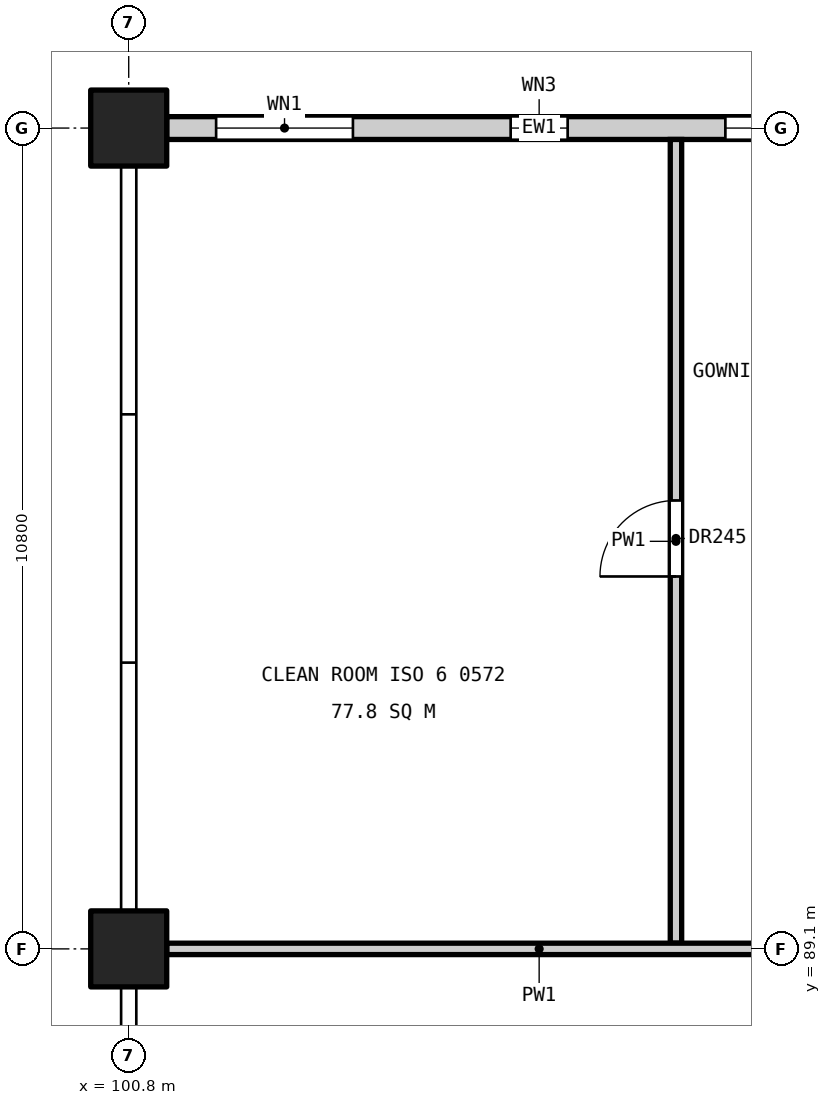
"""IFC4 building model, lengths in metres.
Left out: names, types, materials, properties, quantities, classifications, styles, units other than length and angle.
Written with IfcOpenShell. Run it as: python <this file> out.ifc"""

import sys

from ifc_helpers import new_model, si_unit, direction, frame, frame_2d, origin, origin_2d, place, context, subcontext, project, spatial, rectangle, extrude, element, fill, save


model = new_model("IFC4")
c1 = context("Model", 3, precision=1e-05, world=origin(), true_north=direction((0.0, 1.0)))
c2 = subcontext(c1, "Body", "Model", "MODEL_VIEW")
j1 = project(units=[si_unit("LENGTHUNIT", "METRE"), si_unit("PLANEANGLEUNIT", "RADIAN")], contexts=[c1])
p1 = place(None, origin())
s1 = spatial("IfcSite", under=j1, at=p1, CompositionType="ELEMENT")
p2 = place(p1, origin())
s2 = spatial("IfcBuilding", under=s1, at=p2, CompositionType="ELEMENT")
p3 = place(p2, frame((0.0, 0.0, 27.0)))
s3 = spatial("IfcBuildingStorey", under=s2, at=p3, CompositionType="ELEMENT", Elevation=27.0)
for number, where, z_axis, x_axis in (
    (1, (100.8, 89.1, 0.0), (0.0, 0.0, 1.0), (1.0, 0.0, 0.0)),
    (2, (100.8, 99.9, 0.0), (0.0, 0.0, 1.0), (1.0, 0.0, 0.0)),
):
    element("IfcColumn", number, at=place(p3, frame(where, z_axis=z_axis, x_axis=x_axis)), inside=s3, PredefinedType="COLUMN", context=c2, shape_type="SweptSolid", body=[
        extrude(rectangle(XDim=1.0, YDim=1.0, at=origin_2d()), origin(), (0.0, 0.0, 1.0), 4.8),
    ])
p4 = place(p3, frame((111.1, 99.9, 0.0), z_axis=(0.0, 0.0, 1.0), x_axis=(-1.0, 0.0, 0.0)))
e3 = element("IfcWall", 3, at=p4, inside=s3, PredefinedType="STANDARD", context=c2, shape_type="SweptSolid", body=[
    extrude(rectangle(XDim=9.8, YDim=0.3, at=frame_2d((4.9, 0.0))), origin(), (0.0, 0.0, 1.0), 3.85),
])
p5 = place(p4, frame((0.65, 0.0, 0.9)))
e4 = element("IfcOpeningElement", 4, at=p5, cuts=e3, PredefinedType="OPENING", context=c2, shape_type="SweptSolid", body=[
    extrude(rectangle(XDim=1.8, YDim=2.4, at=frame_2d((0.9, 1.2))), frame((0.0, 0.16, 0.0), z_axis=(0.0, -1.0, 0.0), x_axis=(1.0, 0.0, 0.0)), (0.0, 0.0, 1.0), 0.32),
])
p6 = place(p4, frame((4.525, 0.0, 0.8)))
e5 = element("IfcOpeningElement", 5, at=p6, cuts=e3, PredefinedType="OPENING", context=c2, shape_type="SweptSolid", body=[
    extrude(rectangle(XDim=0.75, YDim=1.2, at=frame_2d((0.375, 0.6))), frame((0.0, 0.16, 0.0), z_axis=(0.0, -1.0, 0.0), x_axis=(1.0, 0.0, 0.0)), (0.0, 0.0, 1.0), 0.32),
])
p7 = place(p4, frame((7.35, 0.0, 0.9)))
e6 = element("IfcOpeningElement", 6, at=p7, cuts=e3, PredefinedType="OPENING", context=c2, shape_type="SweptSolid", body=[
    extrude(rectangle(XDim=1.8, YDim=2.4, at=frame_2d((0.9, 1.2))), frame((0.0, 0.16, 0.0), z_axis=(0.0, -1.0, 0.0), x_axis=(1.0, 0.0, 0.0)), (0.0, 0.0, 1.0), 0.32),
])
p8 = place(p3, frame((108.0, 89.175, 0.0), z_axis=(0.0, 0.0, 1.0), x_axis=(0.0, 1.0, 0.0)))
e7 = element("IfcWall", 7, at=p8, inside=s3, PredefinedType="PARTITIONING", context=c2, shape_type="SweptSolid", body=[
    extrude(rectangle(XDim=10.575, YDim=0.15, at=frame_2d((5.288, 0.0))), origin(), (0.0, 0.0, 1.0), 3.55),
])
p9 = place(p8, frame((4.825, 0.0, 0.0)))
e8 = element("IfcOpeningElement", 8, at=p9, cuts=e7, PredefinedType="OPENING", context=c2, shape_type="SweptSolid", body=[
    extrude(rectangle(XDim=1.0, YDim=2.1, at=frame_2d((0.5, 1.05))), frame((0.0, 0.085, 0.0), z_axis=(0.0, -1.0, 0.0), x_axis=(1.0, 0.0, 0.0)), (0.0, 0.0, 1.0), 0.17),
])
p10 = place(p3, frame((111.1, 89.1, 0.0), z_axis=(0.0, 0.0, 1.0), x_axis=(-1.0, 0.0, 0.0)))
e9 = element("IfcWall", 9, at=p10, inside=s3, PredefinedType="PARTITIONING", context=c2, shape_type="SweptSolid", body=[
    extrude(rectangle(XDim=9.8, YDim=0.15, at=frame_2d((4.9, 0.0))), origin(), (0.0, 0.0, 1.0), 3.85),
])
p11 = place(p5, origin())
e10 = element("IfcWindow", 10, at=p11, inside=s3, PartitioningType="SINGLE_PANEL", PredefinedType="WINDOW", context=c2, shape_type="SweptSolid", body=[
    extrude(rectangle(XDim=1.8, YDim=2.4, at=frame_2d((0.9, 1.2))), frame((0.0, 0.03, 0.0), z_axis=(0.0, -1.0, 0.0), x_axis=(1.0, 0.0, 0.0)), (0.0, 0.0, 1.0), 0.06),
])
fill(e4, e10)
p12 = place(p6, origin())
e11 = element("IfcWindow", 11, at=p12, inside=s3, PartitioningType="SINGLE_PANEL", PredefinedType="WINDOW", context=c2, shape_type="SweptSolid", body=[
    extrude(rectangle(XDim=0.75, YDim=1.2, at=frame_2d((0.375, 0.6))), frame((0.0, 0.03, 0.0), z_axis=(0.0, -1.0, 0.0), x_axis=(1.0, 0.0, 0.0)), (0.0, 0.0, 1.0), 0.06),
])
fill(e5, e11)
p13 = place(p7, origin())
e12 = element("IfcWindow", 12, at=p13, inside=s3, PartitioningType="SINGLE_PANEL", PredefinedType="WINDOW", context=c2, shape_type="SweptSolid", body=[
    extrude(rectangle(XDim=1.8, YDim=2.4, at=frame_2d((0.9, 1.2))), frame((0.0, 0.03, 0.0), z_axis=(0.0, -1.0, 0.0), x_axis=(1.0, 0.0, 0.0)), (0.0, 0.0, 1.0), 0.06),
])
fill(e6, e12)
p14 = place(p9, origin())
e13 = element("IfcDoor", 13, at=p14, inside=s3, OperationType="SINGLE_SWING_LEFT", PredefinedType="DOOR", context=c2, shape_type="SweptSolid", body=[
    extrude(rectangle(XDim=1.0, YDim=2.1, at=frame_2d((0.5, 1.05))), frame((0.0, 0.025, 0.0), z_axis=(0.0, -1.0, 0.0), x_axis=(1.0, 0.0, 0.0)), (0.0, 0.0, 1.0), 0.05),
])
fill(e8, e13)
save(model, sys.argv[1])
